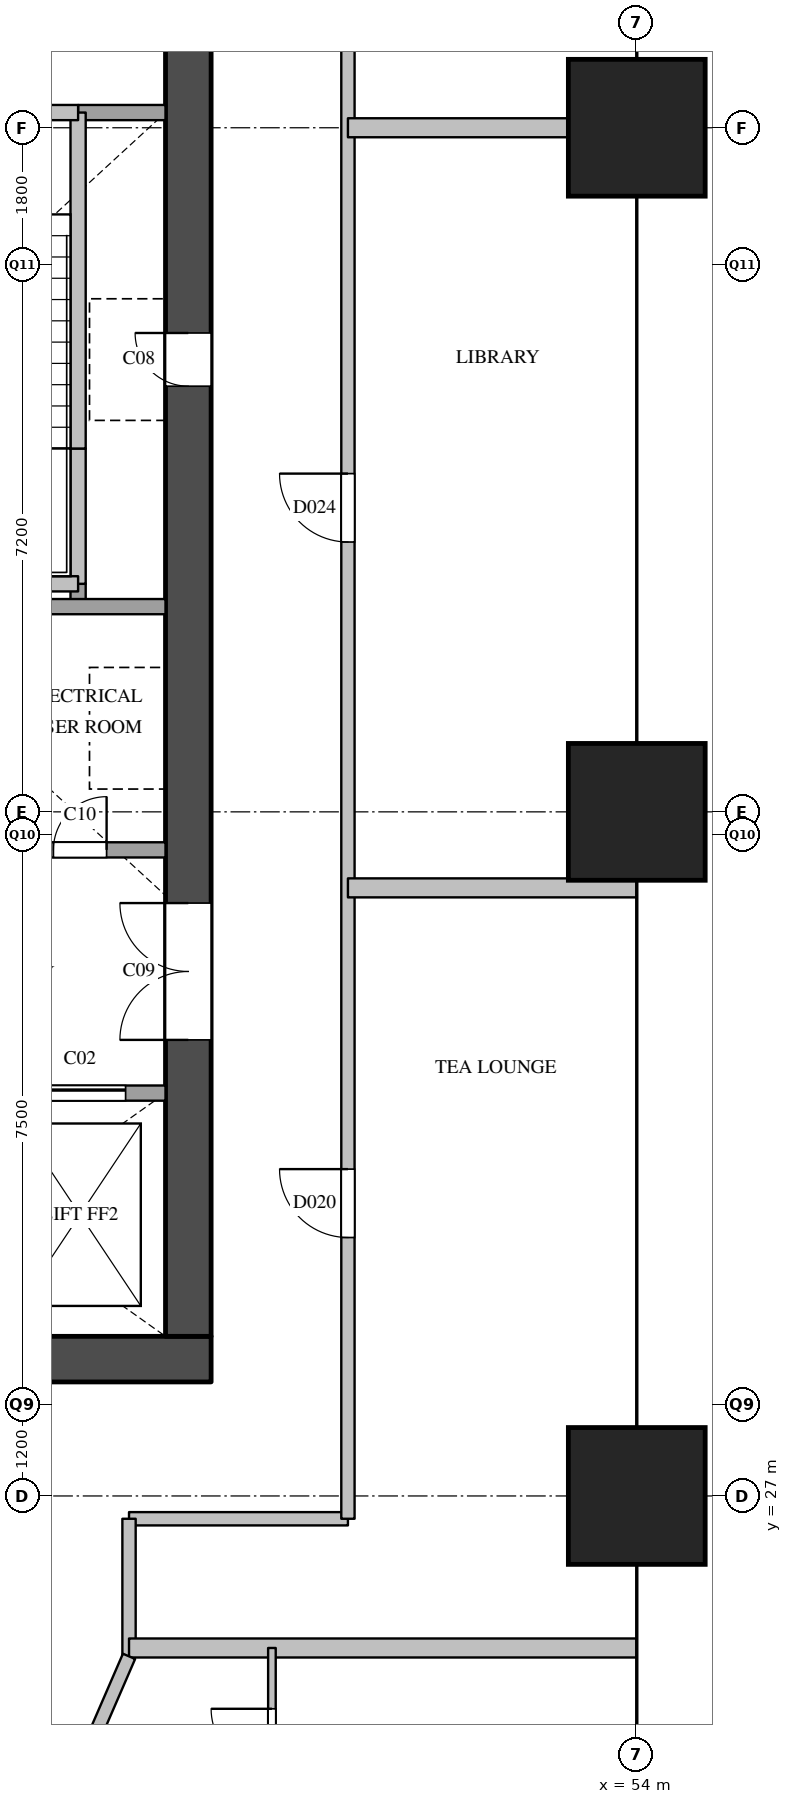
"""IFC4 building model, lengths in metres.
Left out: names, types, materials, properties, quantities, classifications, styles, units other than length and angle.
Written with IfcOpenShell. Run it as: python <this file> out.ifc"""

import sys

from ifc_helpers import new_model, si_unit, direction, frame, frame_2d, origin, origin_2d, place, context, subcontext, project, spatial, rectangle, extrude, element, fill, save


model = new_model("IFC4")
c1 = context("Model", 3, precision=1e-05, world=origin(), true_north=direction((0.0, 1.0)))
c2 = subcontext(c1, "Body", "Model", "MODEL_VIEW")
j1 = project(units=[si_unit("LENGTHUNIT", "METRE"), si_unit("PLANEANGLEUNIT", "RADIAN")], contexts=[c1])
p1 = place(None, origin())
s1 = spatial("IfcSite", under=j1, at=p1, CompositionType="ELEMENT")
p2 = place(p1, origin())
s2 = spatial("IfcBuilding", under=s1, at=p2, CompositionType="ELEMENT")
p3 = place(p2, frame((0.0, 0.0, 119.6)))
s3 = spatial("IfcBuildingStorey", under=s2, at=p3, CompositionType="ELEMENT", Elevation=119.6)
for number, where, z_axis, x_axis in (
    (1, (54.0, 27.0, 0.0), (0.0, 0.0, 1.0), (1.0, 0.0, 0.0)),
    (2, (54.0, 36.0, 0.0), (0.0, 0.0, 1.0), (1.0, 0.0, 0.0)),
    (3, (54.0, 45.0, 0.0), (0.0, 0.0, 1.0), (1.0, 0.0, 0.0)),
):
    element("IfcColumn", number, at=place(p3, frame(where, z_axis=z_axis, x_axis=x_axis)), inside=s3, PredefinedType="COLUMN", context=c2, shape_type="SweptSolid", body=[
        extrude(rectangle(XDim=1.8, YDim=1.8, at=origin_2d()), origin(), (0.0, 0.0, 1.0), 3.8),
    ])
p4 = place(p3, frame((36.0, 28.8, 0.0), z_axis=(0.0, 0.0, 1.0), x_axis=(1.0, 0.0, 0.0)))
e4 = element("IfcWall", 4, at=p4, inside=s3, PredefinedType="SHEAR", context=c2, shape_type="SweptSolid", body=[
    extrude(rectangle(XDim=12.4, YDim=0.6, at=frame_2d((6.2, 0.0))), origin(), (0.0, 0.0, 1.0), 3.3),
])
p5 = place(p3, frame((48.1, 29.1, 0.0), z_axis=(0.0, 0.0, 1.0), x_axis=(0.0, 1.0, 0.0)))
e5 = element("IfcWall", 5, at=p5, inside=s3, PredefinedType="SHEAR", context=c2, shape_type="SweptSolid", body=[
    extrude(rectangle(XDim=20.3, YDim=0.6, at=frame_2d((10.15, 0.0))), origin(), (0.0, 0.0, 1.0), 3.3),
])
p6 = place(p5, frame((12.5, 0.0, 0.0)))
e6 = element("IfcOpeningElement", 6, at=p6, cuts=e5, PredefinedType="OPENING", context=c2, shape_type="SweptSolid", body=[
    extrude(rectangle(XDim=0.7, YDim=2.1, at=frame_2d((0.35, 1.05))), frame((0.0, 0.31, 0.0), z_axis=(0.0, -1.0, 0.0), x_axis=(1.0, 0.0, 0.0)), (0.0, 0.0, 1.0), 0.62),
])
p7 = place(p5, frame((3.9, 0.0, 0.0)))
e7 = element("IfcOpeningElement", 7, at=p7, cuts=e5, PredefinedType="OPENING", context=c2, shape_type="SweptSolid", body=[
    extrude(rectangle(XDim=1.8, YDim=2.1, at=frame_2d((0.9, 1.05))), frame((0.0, 0.31, 0.0), z_axis=(0.0, -1.0, 0.0), x_axis=(1.0, 0.0, 0.0)), (0.0, 0.0, 1.0), 0.62),
])
p8 = place(p3, frame((46.65, 38.7, 0.0), z_axis=(0.0, 0.0, 1.0), x_axis=(0.0, 1.0, 0.0)))
e8 = element("IfcWall", 8, at=p8, inside=s3, PredefinedType="SOLIDWALL", context=c2, shape_type="SweptSolid", body=[
    extrude(rectangle(XDim=0.3, YDim=0.2, at=frame_2d((0.15, 0.0))), origin(), (0.0, 0.0, 1.0), 3.3),
])
p9 = place(p3, frame((46.65, 39.0, 0.0), z_axis=(0.0, 0.0, 1.0), x_axis=(0.0, 1.0, 0.0)))
e9 = element("IfcWall", 9, at=p9, inside=s3, PredefinedType="SOLIDWALL", context=c2, shape_type="SweptSolid", body=[
    extrude(rectangle(XDim=1.78, YDim=0.2, at=frame_2d((0.89, 0.0))), origin(), (0.0, 0.0, 1.0), 3.3),
])
p10 = place(p3, frame((46.65, 40.78, 0.0), z_axis=(0.0, 0.0, 1.0), x_axis=(0.0, 1.0, 0.0)))
e10 = element("IfcWall", 10, at=p10, inside=s3, PredefinedType="SOLIDWALL", context=c2, shape_type="SweptSolid", body=[
    extrude(rectangle(XDim=4.42, YDim=0.2, at=frame_2d((2.21, 0.0))), origin(), (0.0, 0.0, 1.0), 3.3),
])
p11 = place(p3, frame((36.6, 32.3, 0.0), z_axis=(0.0, 0.0, 1.0), x_axis=(1.0, 0.0, 0.0)))
e11 = element("IfcWall", 11, at=p11, inside=s3, PredefinedType="SOLIDWALL", context=c2, shape_type="SweptSolid", body=[
    extrude(rectangle(XDim=11.2, YDim=0.2, at=frame_2d((5.6, 0.0))), origin(), (0.0, 0.0, 1.0), 3.3),
])
p12 = place(p11, frame((7.225, 0.0, 0.0)))
e12 = element("IfcOpeningElement", 12, at=p12, cuts=e11, PredefinedType="OPENING", context=c2, shape_type="SweptSolid", body=[
    extrude(rectangle(XDim=1.2, YDim=2.1, at=frame_2d((0.6, 1.05))), frame((0.0, 0.11, 0.0), z_axis=(0.0, -1.0, 0.0), x_axis=(1.0, 0.0, 0.0)), (0.0, 0.0, 1.0), 0.22),
])
p13 = place(p11, frame((9.475, 0.0, 0.0)))
e13 = element("IfcOpeningElement", 13, at=p13, cuts=e11, PredefinedType="OPENING", context=c2, shape_type="SweptSolid", body=[
    extrude(rectangle(XDim=1.2, YDim=2.1, at=frame_2d((0.6, 1.05))), frame((0.0, 0.11, 0.0), z_axis=(0.0, -1.0, 0.0), x_axis=(1.0, 0.0, 0.0)), (0.0, 0.0, 1.0), 0.22),
])
p14 = place(p3, frame((43.3, 35.5, 0.0), z_axis=(0.0, 0.0, 1.0), x_axis=(1.0, 0.0, 0.0)))
e14 = element("IfcWall", 14, at=p14, inside=s3, PredefinedType="SOLIDWALL", context=c2, shape_type="SweptSolid", body=[
    extrude(rectangle(XDim=4.5, YDim=0.2, at=frame_2d((2.25, 0.0))), origin(), (0.0, 0.0, 1.0), 3.3),
])
p15 = place(p14, frame((0.525, 0.0, 0.0)))
e15 = element("IfcOpeningElement", 15, at=p15, cuts=e14, PredefinedType="OPENING", context=c2, shape_type="SweptSolid", body=[
    extrude(rectangle(XDim=1.2, YDim=2.1, at=frame_2d((0.6, 1.05))), frame((0.0, 0.11, 0.0), z_axis=(0.0, -1.0, 0.0), x_axis=(1.0, 0.0, 0.0)), (0.0, 0.0, 1.0), 0.22),
])
p16 = place(p14, frame((3.025, 0.0, 0.0)))
e16 = element("IfcOpeningElement", 16, at=p16, cuts=e14, PredefinedType="OPENING", context=c2, shape_type="SweptSolid", body=[
    extrude(rectangle(XDim=0.7, YDim=2.1, at=frame_2d((0.35, 1.05))), frame((0.0, 0.11, 0.0), z_axis=(0.0, -1.0, 0.0), x_axis=(1.0, 0.0, 0.0)), (0.0, 0.0, 1.0), 0.22),
])
p17 = place(p3, frame((43.3, 38.7, 0.0), z_axis=(0.0, 0.0, 1.0), x_axis=(1.0, 0.0, 0.0)))
e17 = element("IfcWall", 17, at=p17, inside=s3, PredefinedType="SOLIDWALL", context=c2, shape_type="SweptSolid", body=[
    extrude(rectangle(XDim=4.5, YDim=0.2, at=frame_2d((2.25, 0.0))), origin(), (0.0, 0.0, 1.0), 3.3),
])
p18 = place(p3, frame((43.4, 39.0, 0.0), z_axis=(0.0, 0.0, 1.0), x_axis=(1.0, 0.0, 0.0)))
e18 = element("IfcWall", 18, at=p18, inside=s3, PredefinedType="SOLIDWALL", context=c2, shape_type="SweptSolid", body=[
    extrude(rectangle(XDim=3.25, YDim=0.2, at=frame_2d((1.625, 0.0))), origin(), (0.0, 0.0, 1.0), 3.3),
])
p19 = place(p3, frame((46.65, 45.2, 0.0), z_axis=(0.0, 0.0, 1.0), x_axis=(1.0, 0.0, 0.0)))
e19 = element("IfcWall", 19, at=p19, inside=s3, PredefinedType="SOLIDWALL", context=c2, shape_type="SweptSolid", body=[
    extrude(rectangle(XDim=1.15, YDim=0.2, at=frame_2d((0.575, 0.0))), origin(), (0.0, 0.0, 1.0), 3.3),
])
p20 = place(p3, frame((36.6, 45.2, 0.0), z_axis=(0.0, 0.0, 1.0), x_axis=(1.0, 0.0, 0.0)))
e20 = element("IfcWall", 20, at=p20, inside=s3, PredefinedType="SOLIDWALL", context=c2, shape_type="SweptSolid", body=[
    extrude(rectangle(XDim=10.05, YDim=0.2, at=frame_2d((5.025, 0.0))), origin(), (0.0, 0.0, 1.0), 3.3),
])
p21 = place(p20, frame((1.125, 0.0, 0.0)))
e21 = element("IfcOpeningElement", 21, at=p21, cuts=e20, PredefinedType="OPENING", context=c2, shape_type="SweptSolid", body=[
    extrude(rectangle(XDim=1.1, YDim=2.1, at=frame_2d((0.55, 1.05))), frame((0.0, 0.11, 0.0), z_axis=(0.0, -1.0, 0.0), x_axis=(1.0, 0.0, 0.0)), (0.0, 0.0, 1.0), 0.22),
])
p22 = place(p20, frame((4.475, 0.0, 0.0)))
e22 = element("IfcOpeningElement", 22, at=p22, cuts=e20, PredefinedType="OPENING", context=c2, shape_type="SweptSolid", body=[
    extrude(rectangle(XDim=1.1, YDim=2.1, at=frame_2d((0.55, 1.05))), frame((0.0, 0.11, 0.0), z_axis=(0.0, -1.0, 0.0), x_axis=(1.0, 0.0, 0.0)), (0.0, 0.0, 1.0), 0.22),
])
p23 = place(p20, frame((7.825, 0.0, 0.0)))
e23 = element("IfcOpeningElement", 23, at=p23, cuts=e20, PredefinedType="OPENING", context=c2, shape_type="SweptSolid", body=[
    extrude(rectangle(XDim=1.1, YDim=2.1, at=frame_2d((0.55, 1.05))), frame((0.0, 0.11, 0.0), z_axis=(0.0, -1.0, 0.0), x_axis=(1.0, 0.0, 0.0)), (0.0, 0.0, 1.0), 0.22),
])
p24 = place(p3, frame((47.32, 26.7, 0.0), z_axis=(0.0, 0.0, 1.0), x_axis=(1.0, 0.0, 0.0)))
e24 = element("IfcWall", 24, at=p24, inside=s3, PredefinedType="PARTITIONING", context=c2, shape_type="SweptSolid", body=[
    extrude(rectangle(XDim=2.88, YDim=0.175, at=frame_2d((1.44, 0.0))), origin(), (0.0, 0.0, 1.0), 2.3),
])
p25 = place(p3, frame((47.32, 24.89, 0.0), z_axis=(0.0, 0.0, 1.0), x_axis=(0.0, 1.0, 0.0)))
e25 = element("IfcWall", 25, at=p25, inside=s3, PredefinedType="PARTITIONING", context=c2, shape_type="SweptSolid", body=[
    extrude(rectangle(XDim=1.81, YDim=0.175, at=frame_2d((0.905, 0.0))), origin(), (0.0, 0.0, 1.0), 2.3),
])
p26 = place(p3, frame((50.2, 26.7, 0.0), z_axis=(0.0, 0.0, 1.0), x_axis=(0.0, 1.0, 0.0)))
e26 = element("IfcWall", 26, at=p26, inside=s3, PredefinedType="PARTITIONING", context=c2, shape_type="SweptSolid", body=[
    extrude(rectangle(XDim=25.1, YDim=0.175, at=frame_2d((12.55, 0.0))), origin(), (0.0, 0.0, 1.0), 2.3),
])
p27 = place(p26, frame((3.7, 0.0, 0.0)))
e27 = element("IfcOpeningElement", 27, at=p27, cuts=e26, PredefinedType="OPENING", context=c2, shape_type="SweptSolid", body=[
    extrude(rectangle(XDim=0.9, YDim=2.1, at=frame_2d((0.45, 1.05))), frame((0.0, 0.097, 0.0), z_axis=(0.0, -1.0, 0.0), x_axis=(1.0, 0.0, 0.0)), (0.0, 0.0, 1.0), 0.195),
])
p28 = place(p26, frame((12.85, 0.0, 0.0)))
e28 = element("IfcOpeningElement", 28, at=p28, cuts=e26, PredefinedType="OPENING", context=c2, shape_type="SweptSolid", body=[
    extrude(rectangle(XDim=0.9, YDim=2.1, at=frame_2d((0.45, 1.05))), frame((0.0, 0.097, 0.0), z_axis=(0.0, -1.0, 0.0), x_axis=(1.0, 0.0, 0.0)), (0.0, 0.0, 1.0), 0.195),
])
p29 = place(p26, frame((21.25, 0.0, 0.0)))
e29 = element("IfcOpeningElement", 29, at=p29, cuts=e26, PredefinedType="OPENING", context=c2, shape_type="SweptSolid", body=[
    extrude(rectangle(XDim=0.9, YDim=2.1, at=frame_2d((0.45, 1.05))), frame((0.0, 0.097, 0.0), z_axis=(0.0, -1.0, 0.0), x_axis=(1.0, 0.0, 0.0)), (0.0, 0.0, 1.0), 0.195),
])
p30 = place(p3, frame((47.32, 25.0, 0.0), z_axis=(0.0, 0.0, 1.0), x_axis=(1.0, 0.0, 0.0)))
e30 = element("IfcWall", 30, at=p30, inside=s3, PredefinedType="PARTITIONING", context=c2, shape_type="SweptSolid", body=[
    extrude(rectangle(XDim=6.68, YDim=0.25, at=frame_2d((3.34, 0.0))), origin(), (0.0, 0.0, 1.0), 2.3),
])
p31 = place(p3, frame((50.2, 35.0, 0.0), z_axis=(0.0, 0.0, 1.0), x_axis=(1.0, 0.0, 0.0)))
e31 = element("IfcWall", 31, at=p31, inside=s3, PredefinedType="PARTITIONING", context=c2, shape_type="SweptSolid", body=[
    extrude(rectangle(XDim=3.8, YDim=0.25, at=frame_2d((1.9, 0.0))), origin(), (0.0, 0.0, 1.0), 2.3),
])
p32 = place(p3, frame((50.2, 45.0, 0.0), z_axis=(0.0, 0.0, 1.0), x_axis=(1.0, 0.0, 0.0)))
e32 = element("IfcWall", 32, at=p32, inside=s3, PredefinedType="PARTITIONING", context=c2, shape_type="SweptSolid", body=[
    extrude(rectangle(XDim=3.8, YDim=0.25, at=frame_2d((1.9, 0.0))), origin(), (0.0, 0.0, 1.0), 3.3),
])
p33 = place(p3, frame((49.2, 22.6, 0.0), z_axis=(0.0, 0.0, 1.0), x_axis=(0.0, 1.0, 0.0)))
e33 = element("IfcWall", 33, at=p33, inside=s3, PredefinedType="PARTITIONING", context=c2, shape_type="SweptSolid", body=[
    extrude(rectangle(XDim=2.4, YDim=0.1, at=frame_2d((1.2, 0.0))), origin(), (0.0, 0.0, 1.0), 3.3),
])
p34 = place(p33, frame((0.8, 0.0, 0.0)))
e34 = element("IfcOpeningElement", 34, at=p34, cuts=e33, PredefinedType="OPENING", context=c2, shape_type="SweptSolid", body=[
    extrude(rectangle(XDim=0.8, YDim=2.1, at=frame_2d((0.4, 1.05))), frame((0.0, 0.06, 0.0), z_axis=(0.0, -1.0, 0.0), x_axis=(1.0, 0.0, 0.0)), (0.0, 0.0, 1.0), 0.12),
])
p35 = place(p3, frame((47.32, 24.89, 0.0), z_axis=(0.0, 0.0, 1.0), x_axis=(-0.397633632391, -0.917544273804, 0.0)))
e35 = element("IfcWall", 35, at=p35, inside=s3, PredefinedType="PARTITIONING", context=c2, shape_type="SweptSolid", body=[
    extrude(rectangle(XDim=1.308, YDim=0.175, at=frame_2d((0.654, 0.0))), origin(), (0.0, 0.0, 1.0), 3.3),
])
p36 = place(p13, origin())
e36 = element("IfcDoor", 36, at=p36, inside=s3, OperationType="SLIDING_TO_LEFT", PredefinedType="DOOR", context=c2, shape_type="SweptSolid", body=[
    extrude(rectangle(XDim=1.2, YDim=2.1, at=frame_2d((0.6, 1.05))), frame((0.0, 0.025, 0.0), z_axis=(0.0, -1.0, 0.0), x_axis=(1.0, 0.0, 0.0)), (0.0, 0.0, 1.0), 0.05),
])
fill(e13, e36)
p37 = place(p6, origin())
e37 = element("IfcDoor", 37, at=p37, inside=s3, OperationType="SINGLE_SWING_RIGHT", PredefinedType="DOOR", context=c2, shape_type="SweptSolid", body=[
    extrude(rectangle(XDim=0.7, YDim=2.1, at=frame_2d((0.35, 1.05))), frame((0.0, 0.025, 0.0), z_axis=(0.0, -1.0, 0.0), x_axis=(1.0, 0.0, 0.0)), (0.0, 0.0, 1.0), 0.05),
])
fill(e6, e37)
p38 = place(p7, origin())
e38 = element("IfcDoor", 38, at=p38, inside=s3, OperationType="DOUBLE_DOOR_SINGLE_SWING", PredefinedType="DOOR", context=c2, shape_type="SweptSolid", body=[
    extrude(rectangle(XDim=1.8, YDim=2.1, at=frame_2d((0.9, 1.05))), frame((0.0, 0.025, 0.0), z_axis=(0.0, -1.0, 0.0), x_axis=(1.0, 0.0, 0.0)), (0.0, 0.0, 1.0), 0.05),
])
fill(e7, e38)
p39 = place(p16, origin())
e39 = element("IfcDoor", 39, at=p39, inside=s3, OperationType="SINGLE_SWING_RIGHT", PredefinedType="DOOR", context=c2, shape_type="SweptSolid", body=[
    extrude(rectangle(XDim=0.7, YDim=2.1, at=frame_2d((0.35, 1.05))), frame((0.0, 0.025, 0.0), z_axis=(0.0, -1.0, 0.0), x_axis=(1.0, 0.0, 0.0)), (0.0, 0.0, 1.0), 0.05),
])
fill(e16, e39)
p40 = place(p34, origin())
e40 = element("IfcDoor", 40, at=p40, inside=s3, OperationType="SINGLE_SWING_RIGHT", PredefinedType="DOOR", context=c2, shape_type="SweptSolid", body=[
    extrude(rectangle(XDim=0.8, YDim=2.1, at=frame_2d((0.4, 1.05))), frame((0.0, 0.025, 0.0), z_axis=(0.0, -1.0, 0.0), x_axis=(1.0, 0.0, 0.0)), (0.0, 0.0, 1.0), 0.05),
])
fill(e34, e40)
p41 = place(p27, origin())
e41 = element("IfcDoor", 41, at=p41, inside=s3, OperationType="SINGLE_SWING_RIGHT", PredefinedType="DOOR", context=c2, shape_type="SweptSolid", body=[
    extrude(rectangle(XDim=0.9, YDim=2.1, at=frame_2d((0.45, 1.05))), frame((0.0, 0.025, 0.0), z_axis=(0.0, -1.0, 0.0), x_axis=(1.0, 0.0, 0.0)), (0.0, 0.0, 1.0), 0.05),
])
fill(e27, e41)
p42 = place(p28, origin())
e42 = element("IfcDoor", 42, at=p42, inside=s3, OperationType="SINGLE_SWING_RIGHT", PredefinedType="DOOR", context=c2, shape_type="SweptSolid", body=[
    extrude(rectangle(XDim=0.9, YDim=2.1, at=frame_2d((0.45, 1.05))), frame((0.0, 0.025, 0.0), z_axis=(0.0, -1.0, 0.0), x_axis=(1.0, 0.0, 0.0)), (0.0, 0.0, 1.0), 0.05),
])
fill(e28, e42)
save(model, sys.argv[1])
